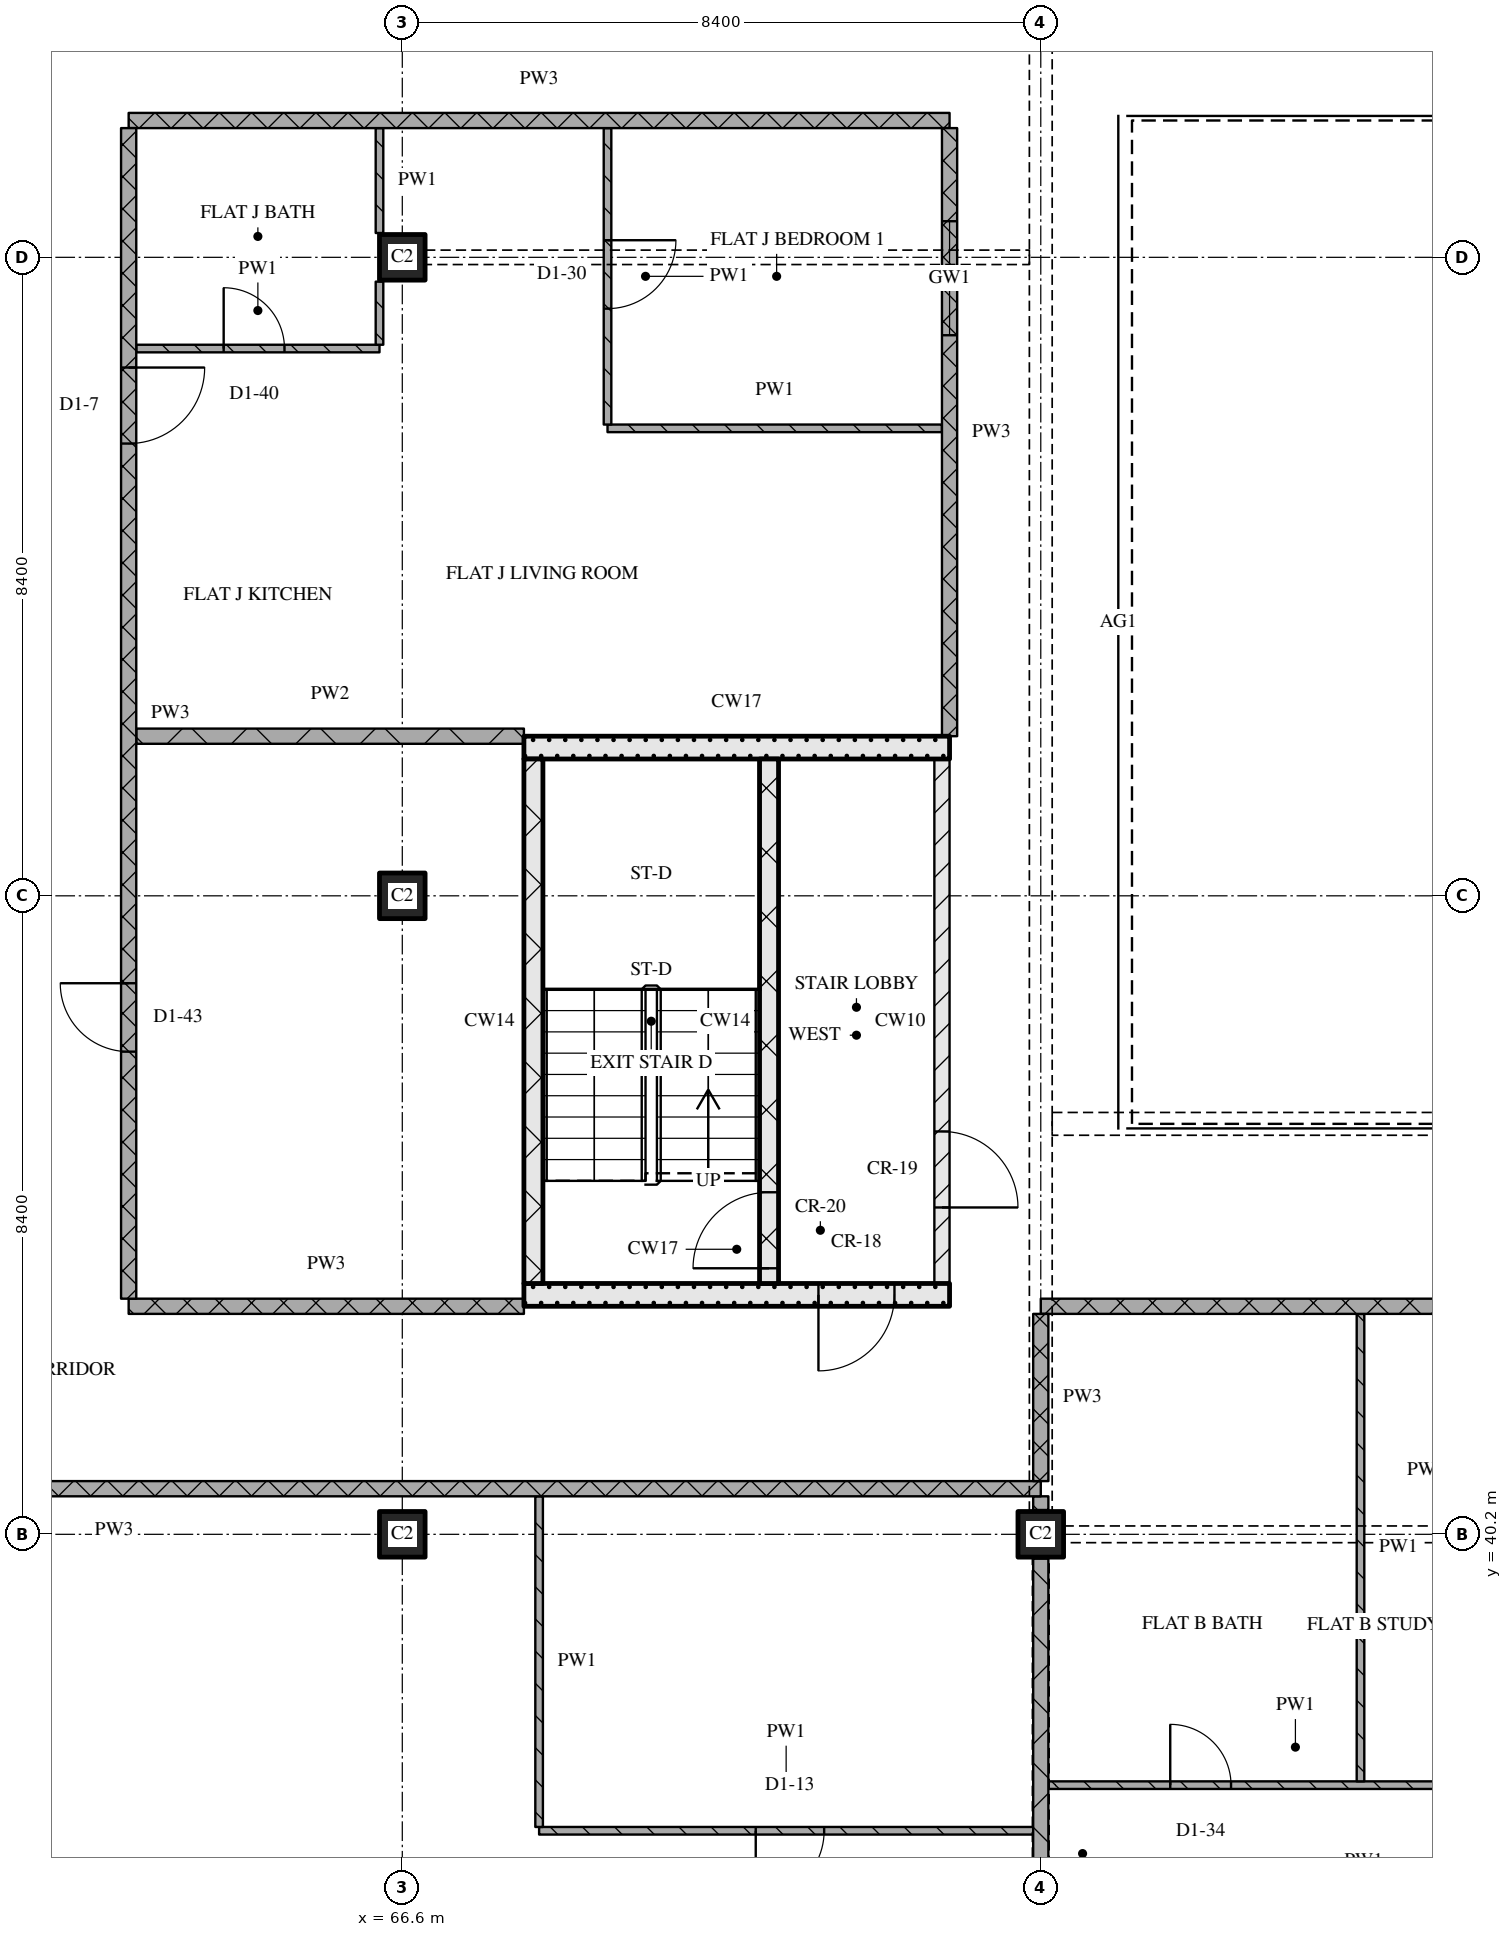
"""IFC4 building model, lengths in metres.
Left out: names, types, materials, properties, quantities, classifications, styles, units other than length and angle.
Written with IfcOpenShell. Run it as: python <this file> out.ifc"""

import sys

from ifc_helpers import new_model, si_unit, direction, frame, frame_2d, origin, origin_2d, place, context, subcontext, project, spatial, rectangle, extrude, element, fill, save


model = new_model("IFC4")
c1 = context("Model", 3, precision=1e-05, world=origin(), true_north=direction((0.0, 1.0)))
c2 = subcontext(c1, "Body", "Model", "MODEL_VIEW")
j1 = project(units=[si_unit("LENGTHUNIT", "METRE"), si_unit("PLANEANGLEUNIT", "RADIAN")], contexts=[c1])
p1 = place(None, origin())
s1 = spatial("IfcSite", under=j1, at=p1, CompositionType="ELEMENT")
p2 = place(p1, origin())
s2 = spatial("IfcBuilding", under=s1, at=p2, CompositionType="ELEMENT")
p3 = place(p2, frame((0.0, 0.0, 205.5)))
s3 = spatial("IfcBuildingStorey", under=s2, at=p3, CompositionType="ELEMENT", Elevation=205.5)
for number, where, z_axis, x_axis in (
    (1, (66.6, 40.2, 0.0), (0.0, 0.0, 1.0), (1.0, 0.0, 0.0)),
    (2, (66.6, 48.6, 0.0), (0.0, 0.0, 1.0), (1.0, 0.0, 0.0)),
    (3, (66.6, 57.0, 0.0), (0.0, 0.0, 1.0), (1.0, 0.0, 0.0)),
    (4, (75.0, 40.2, 0.0), (0.0, 0.0, 1.0), (1.0, 0.0, 0.0)),
):
    element("IfcColumn", number, at=place(p3, frame(where, z_axis=z_axis, x_axis=x_axis)), inside=s3, PredefinedType="COLUMN", context=c2, shape_type="SweptSolid", body=[
        extrude(rectangle(XDim=0.6, YDim=0.6, at=origin_2d()), origin(), (0.0, 0.0, 1.0), 3.6),
    ])
p4 = place(p3, frame((68.2, 43.35, 0.0), z_axis=(0.0, 0.0, 1.0), x_axis=(1.0, 0.0, 0.0)))
e5 = element("IfcWall", 5, at=p4, inside=s3, PredefinedType="SOLIDWALL", context=c2, shape_type="SweptSolid", body=[
    extrude(rectangle(XDim=5.6, YDim=0.3, at=frame_2d((2.8, 0.0))), origin(), (0.0, 0.0, 1.0), 3.32),
])
p5 = place(p4, frame((3.875, 0.0, 0.0)))
e6 = element("IfcOpeningElement", 6, at=p5, cuts=e5, PredefinedType="OPENING", context=c2, shape_type="SweptSolid", body=[
    extrude(rectangle(XDim=1.0, YDim=2.1, at=frame_2d((0.5, 1.05))), frame((0.0, 0.16, 0.0), z_axis=(0.0, -1.0, 0.0), x_axis=(1.0, 0.0, 0.0)), (0.0, 0.0, 1.0), 0.32),
])
p6 = place(p3, frame((68.325, 43.5, 0.0), z_axis=(0.0, 0.0, 1.0), x_axis=(0.0, 1.0, 0.0)))
e7 = element("IfcWall", 7, at=p6, inside=s3, PredefinedType="SOLIDWALL", context=c2, shape_type="SweptSolid", body=[
    extrude(rectangle(XDim=6.9, YDim=0.25, at=frame_2d((3.45, 0.0))), origin(), (0.0, 0.0, 1.0), 3.32),
])
p7 = place(p3, frame((71.425, 43.5, 0.0), z_axis=(0.0, 0.0, 1.0), x_axis=(0.0, 1.0, 0.0)))
e8 = element("IfcWall", 8, at=p7, inside=s3, PredefinedType="SOLIDWALL", context=c2, shape_type="SweptSolid", body=[
    extrude(rectangle(XDim=6.9, YDim=0.25, at=frame_2d((3.45, 0.0))), origin(), (0.0, 0.0, 1.0), 3.32),
])
p8 = place(p7, frame((0.2, 0.0, 0.0)))
e9 = element("IfcOpeningElement", 9, at=p8, cuts=e8, PredefinedType="OPENING", context=c2, shape_type="SweptSolid", body=[
    extrude(rectangle(XDim=1.0, YDim=2.1, at=frame_2d((0.5, 1.05))), frame((0.0, 0.135, 0.0), z_axis=(0.0, -1.0, 0.0), x_axis=(1.0, 0.0, 0.0)), (0.0, 0.0, 1.0), 0.27),
])
p9 = place(p3, frame((73.7, 43.5, 0.0), z_axis=(0.0, 0.0, 1.0), x_axis=(0.0, 1.0, 0.0)))
e10 = element("IfcWall", 10, at=p9, inside=s3, PredefinedType="PARTITIONING", context=c2, shape_type="SweptSolid", body=[
    extrude(rectangle(XDim=6.9, YDim=0.2, at=frame_2d((3.45, 0.0))), origin(), (0.0, 0.0, 1.0), 3.32),
])
p10 = place(p9, frame((1.0, 0.0, 0.0)))
e11 = element("IfcOpeningElement", 11, at=p10, cuts=e10, PredefinedType="OPENING", context=c2, shape_type="SweptSolid", body=[
    extrude(rectangle(XDim=1.0, YDim=2.1, at=frame_2d((0.5, 1.05))), frame((0.0, 0.11, 0.0), z_axis=(0.0, -1.0, 0.0), x_axis=(1.0, 0.0, 0.0)), (0.0, 0.0, 1.0), 0.22),
])
p11 = place(p3, frame((68.2, 50.55, 0.0), z_axis=(0.0, 0.0, 1.0), x_axis=(1.0, 0.0, 0.0)))
e12 = element("IfcWall", 12, at=p11, inside=s3, PredefinedType="SOLIDWALL", context=c2, shape_type="SweptSolid", body=[
    extrude(rectangle(XDim=5.6, YDim=0.3, at=frame_2d((2.8, 0.0))), origin(), (0.0, 0.0, 1.0), 3.32),
])
p12 = place(p3, frame((68.4, 36.3, 0.0), z_axis=(0.0, 0.0, 1.0), x_axis=(1.0, 0.0, 0.0)))
e13 = element("IfcWall", 13, at=p12, inside=s3, PredefinedType="PARTITIONING", context=c2, shape_type="SweptSolid", body=[
    extrude(rectangle(XDim=6.5, YDim=0.1, at=frame_2d((3.25, 0.0))), origin(), (0.0, 0.0, 1.0), 3.32),
])
p13 = place(p12, frame((2.85, 0.0, 0.0)))
e14 = element("IfcOpeningElement", 14, at=p13, cuts=e13, PredefinedType="OPENING", context=c2, shape_type="SweptSolid", body=[
    extrude(rectangle(XDim=0.9, YDim=2.1, at=frame_2d((0.45, 1.05))), frame((0.0, 0.06, 0.0), z_axis=(0.0, -1.0, 0.0), x_axis=(1.0, 0.0, 0.0)), (0.0, 0.0, 1.0), 0.12),
])
p14 = place(p3, frame((75.1, 36.9, 0.0), z_axis=(0.0, 0.0, 1.0), x_axis=(1.0, 0.0, 0.0)))
e15 = element("IfcWall", 15, at=p14, inside=s3, PredefinedType="PARTITIONING", context=c2, shape_type="SweptSolid", body=[
    extrude(rectangle(XDim=6.5, YDim=0.1, at=frame_2d((3.25, 0.0))), origin(), (0.0, 0.0, 1.0), 3.32),
])
p15 = place(p14, frame((1.603, 0.0, 0.0)))
e16 = element("IfcOpeningElement", 16, at=p15, cuts=e15, PredefinedType="OPENING", context=c2, shape_type="SweptSolid", body=[
    extrude(rectangle(XDim=0.8, YDim=2.1, at=frame_2d((0.4, 1.05))), frame((0.0, 0.06, 0.0), z_axis=(0.0, -1.0, 0.0), x_axis=(1.0, 0.0, 0.0)), (0.0, 0.0, 1.0), 0.12),
])
p16 = place(p3, frame((75.0, 40.8, 0.0), z_axis=(0.0, 0.0, 1.0), x_axis=(-1.0, 0.0, 0.0)))
e17 = element("IfcWall", 17, at=p16, inside=s3, PredefinedType="PARTITIONING", context=c2, shape_type="SweptSolid", body=[
    extrude(rectangle(XDim=24.38, YDim=0.2, at=frame_2d((12.19, 0.0))), origin(), (0.0, 0.0, 1.0), 3.32),
])
p17 = place(p16, frame((14.35, 0.0, 0.0)))
e18 = element("IfcOpeningElement", 18, at=p17, cuts=e17, PredefinedType="OPENING", context=c2, shape_type="SweptSolid", body=[
    extrude(rectangle(XDim=1.0, YDim=2.1, at=frame_2d((0.5, 1.05))), frame((0.0, 0.11, 0.0), z_axis=(0.0, -1.0, 0.0), x_axis=(1.0, 0.0, 0.0)), (0.0, 0.0, 1.0), 0.22),
])
p18 = place(p3, frame((63.0, 43.2, 0.0), z_axis=(0.0, 0.0, 1.0), x_axis=(1.0, 0.0, 0.0)))
e19 = element("IfcWall", 19, at=p18, inside=s3, PredefinedType="PARTITIONING", context=c2, shape_type="SweptSolid", body=[
    extrude(rectangle(XDim=5.2, YDim=0.2, at=frame_2d((2.6, 0.0))), origin(), (0.0, 0.0, 1.0), 3.32),
])
p19 = place(p3, frame((100.2, 43.2, 0.0), z_axis=(0.0, 0.0, 1.0), x_axis=(-1.0, 0.0, 0.0)))
e20 = element("IfcWall", 20, at=p19, inside=s3, PredefinedType="PARTITIONING", context=c2, shape_type="SweptSolid", body=[
    extrude(rectangle(XDim=25.2, YDim=0.2, at=frame_2d((12.6, 0.0))), origin(), (0.0, 0.0, 1.0), 3.32),
])
p20 = place(p19, frame((4.15, 0.0, 0.0)))
e21 = element("IfcOpeningElement", 21, at=p20, cuts=e20, PredefinedType="OPENING", context=c2, shape_type="SweptSolid", body=[
    extrude(rectangle(XDim=1.0, YDim=2.1, at=frame_2d((0.5, 1.05))), frame((0.0, 0.11, 0.0), z_axis=(0.0, -1.0, 0.0), x_axis=(1.0, 0.0, 0.0)), (0.0, 0.0, 1.0), 0.22),
])
p21 = place(p19, frame((17.35, 0.0, 0.0)))
e22 = element("IfcOpeningElement", 22, at=p21, cuts=e20, PredefinedType="OPENING", context=c2, shape_type="SweptSolid", body=[
    extrude(rectangle(XDim=1.0, YDim=2.1, at=frame_2d((0.5, 1.05))), frame((0.0, 0.11, 0.0), z_axis=(0.0, -1.0, 0.0), x_axis=(1.0, 0.0, 0.0)), (0.0, 0.0, 1.0), 0.22),
])
p22 = place(p3, frame((63.1, 50.7, 0.0), z_axis=(0.0, 0.0, 1.0), x_axis=(1.0, 0.0, 0.0)))
e23 = element("IfcWall", 23, at=p22, inside=s3, PredefinedType="PARTITIONING", context=c2, shape_type="SweptSolid", body=[
    extrude(rectangle(XDim=5.1, YDim=0.2, at=frame_2d((2.55, 0.0))), origin(), (0.0, 0.0, 1.0), 3.32),
])
p23 = place(p3, frame((69.3, 54.75, 0.0), z_axis=(0.0, 0.0, 1.0), x_axis=(1.0, 0.0, 0.0)))
e24 = element("IfcWall", 24, at=p23, inside=s3, PredefinedType="PARTITIONING", context=c2, shape_type="SweptSolid", body=[
    extrude(rectangle(XDim=4.4, YDim=0.1, at=frame_2d((2.2, 0.0))), origin(), (0.0, 0.0, 1.0), 3.32),
])
p24 = place(p3, frame((63.1, 55.8, 0.0), z_axis=(0.0, 0.0, 1.0), x_axis=(1.0, 0.0, 0.0)))
e25 = element("IfcWall", 25, at=p24, inside=s3, PredefinedType="PARTITIONING", context=c2, shape_type="SweptSolid", body=[
    extrude(rectangle(XDim=3.2, YDim=0.1, at=frame_2d((1.6, 0.0))), origin(), (0.0, 0.0, 1.0), 3.32),
])
p25 = place(p24, frame((1.15, 0.0, 0.0)))
e26 = element("IfcOpeningElement", 26, at=p25, cuts=e25, PredefinedType="OPENING", context=c2, shape_type="SweptSolid", body=[
    extrude(rectangle(XDim=0.8, YDim=2.1, at=frame_2d((0.4, 1.05))), frame((0.0, 0.06, 0.0), z_axis=(0.0, -1.0, 0.0), x_axis=(1.0, 0.0, 0.0)), (0.0, 0.0, 1.0), 0.12),
])
p26 = place(p3, frame((63.0, 58.8, 0.0), z_axis=(0.0, 0.0, 1.0), x_axis=(1.0, 0.0, 0.0)))
e27 = element("IfcWall", 27, at=p26, inside=s3, PredefinedType="PARTITIONING", context=c2, shape_type="SweptSolid", body=[
    extrude(rectangle(XDim=10.8, YDim=0.2, at=frame_2d((5.4, 0.0))), origin(), (0.0, 0.0, 1.0), 3.32),
])
p27 = place(p3, frame((63.0, 58.7, 0.0), z_axis=(0.0, 0.0, 1.0), x_axis=(0.0, -1.0, 0.0)))
e28 = element("IfcWall", 28, at=p27, inside=s3, PredefinedType="PARTITIONING", context=c2, shape_type="SweptSolid", body=[
    extrude(rectangle(XDim=15.4, YDim=0.2, at=frame_2d((7.7, 0.0))), origin(), (0.0, 0.0, 1.0), 3.32),
])
p28 = place(p27, frame((3.15, 0.0, 0.0)))
e29 = element("IfcOpeningElement", 29, at=p28, cuts=e28, PredefinedType="OPENING", context=c2, shape_type="SweptSolid", body=[
    extrude(rectangle(XDim=1.0, YDim=2.1, at=frame_2d((0.5, 1.05))), frame((0.0, 0.11, 0.0), z_axis=(0.0, -1.0, 0.0), x_axis=(1.0, 0.0, 0.0)), (0.0, 0.0, 1.0), 0.22),
])
p29 = place(p27, frame((11.25, 0.0, 0.0)))
e30 = element("IfcOpeningElement", 30, at=p29, cuts=e28, PredefinedType="OPENING", context=c2, shape_type="SweptSolid", body=[
    extrude(rectangle(XDim=0.9, YDim=2.1, at=frame_2d((0.45, 1.05))), frame((0.0, 0.11, 0.0), z_axis=(0.0, -1.0, 0.0), x_axis=(1.0, 0.0, 0.0)), (0.0, 0.0, 1.0), 0.22),
])
p30 = place(p3, frame((66.3, 56.68, 0.0), z_axis=(0.0, 0.0, 1.0), x_axis=(0.0, -1.0, 0.0)))
e31 = element("IfcWall", 31, at=p30, inside=s3, PredefinedType="PARTITIONING", context=c2, shape_type="SweptSolid", body=[
    extrude(rectangle(XDim=0.83, YDim=0.1, at=frame_2d((0.415, 0.0))), origin(), (0.0, 0.0, 1.0), 3.32),
])
p31 = place(p3, frame((66.3, 58.7, 0.0), z_axis=(0.0, 0.0, 1.0), x_axis=(0.0, -1.0, 0.0)))
e32 = element("IfcWall", 32, at=p31, inside=s3, PredefinedType="PARTITIONING", context=c2, shape_type="SweptSolid", body=[
    extrude(rectangle(XDim=1.38, YDim=0.1, at=frame_2d((0.69, 0.0))), origin(), (0.0, 0.0, 1.0), 3.32),
])
p32 = place(p3, frame((68.4, 40.7, 0.0), z_axis=(0.0, 0.0, 1.0), x_axis=(0.0, -1.0, 0.0)))
e33 = element("IfcWall", 33, at=p32, inside=s3, PredefinedType="PARTITIONING", context=c2, shape_type="SweptSolid", body=[
    extrude(rectangle(XDim=4.35, YDim=0.1, at=frame_2d((2.175, 0.0))), origin(), (0.0, 0.0, 1.0), 3.32),
])
p33 = place(p3, frame((69.3, 58.7, 0.0), z_axis=(0.0, 0.0, 1.0), x_axis=(0.0, -1.0, 0.0)))
e34 = element("IfcWall", 34, at=p33, inside=s3, PredefinedType="PARTITIONING", context=c2, shape_type="SweptSolid", body=[
    extrude(rectangle(XDim=3.9, YDim=0.1, at=frame_2d((1.95, 0.0))), origin(), (0.0, 0.0, 1.0), 3.32),
])
p34 = place(p33, frame((1.475, 0.0, 0.0)))
e35 = element("IfcOpeningElement", 35, at=p34, cuts=e34, PredefinedType="OPENING", context=c2, shape_type="SweptSolid", body=[
    extrude(rectangle(XDim=0.9, YDim=2.1, at=frame_2d((0.45, 1.05))), frame((0.0, 0.06, 0.0), z_axis=(0.0, -1.0, 0.0), x_axis=(1.0, 0.0, 0.0)), (0.0, 0.0, 1.0), 0.12),
])
p35 = place(p3, frame((73.8, 58.7, 0.0), z_axis=(0.0, 0.0, 1.0), x_axis=(0.0, -1.0, 0.0)))
e36 = element("IfcWall", 36, at=p35, inside=s3, PredefinedType="PARTITIONING", context=c2, shape_type="SweptSolid", body=[
    extrude(rectangle(XDim=8.0, YDim=0.2, at=frame_2d((4.0, 0.0))), origin(), (0.0, 0.0, 1.0), 3.32),
])
p36 = place(p35, frame((1.225, 0.0, 0.9)))
e37 = element("IfcOpeningElement", 37, at=p36, cuts=e36, PredefinedType="OPENING", context=c2, shape_type="SweptSolid", body=[
    extrude(rectangle(XDim=1.5, YDim=1.5, at=frame_2d((0.75, 0.75))), frame((0.0, 0.11, 0.0), z_axis=(0.0, -1.0, 0.0), x_axis=(1.0, 0.0, 0.0)), (0.0, 0.0, 1.0), 0.22),
])
p37 = place(p3, frame((75.0, 43.1, 0.0), z_axis=(0.0, 0.0, 1.0), x_axis=(0.0, -1.0, 0.0)))
e38 = element("IfcWall", 38, at=p37, inside=s3, PredefinedType="PARTITIONING", context=c2, shape_type="SweptSolid", body=[
    extrude(rectangle(XDim=2.2, YDim=0.2, at=frame_2d((1.1, 0.0))), origin(), (0.0, 0.0, 1.0), 2.53),
])
p38 = place(p3, frame((75.0, 39.88, 0.0), z_axis=(0.0, 0.0, 1.0), x_axis=(0.0, -1.0, 0.0)))
e39 = element("IfcWall", 39, at=p38, inside=s3, PredefinedType="PARTITIONING", context=c2, shape_type="SweptSolid", body=[
    extrude(rectangle(XDim=7.76, YDim=0.2, at=frame_2d((3.88, 0.0))), origin(), (0.0, 0.0, 1.0), 2.72),
])
p39 = place(p3, frame((75.0, 40.7, 0.0), z_axis=(0.0, 0.0, 1.0), x_axis=(0.0, -1.0, 0.0)))
e40 = element("IfcWall", 40, at=p39, inside=s3, PredefinedType="PARTITIONING", context=c2, shape_type="SweptSolid", body=[
    extrude(rectangle(XDim=0.18, YDim=0.2, at=frame_2d((0.09, 0.0))), origin(), (0.0, 0.0, 1.0), 3.32),
])
p40 = place(p3, frame((79.206, 43.1, 0.0), z_axis=(0.0, 0.0, 1.0), x_axis=(0.0, -1.0, 0.0)))
e41 = element("IfcWall", 41, at=p40, inside=s3, PredefinedType="PARTITIONING", context=c2, shape_type="SweptSolid", body=[
    extrude(rectangle(XDim=6.15, YDim=0.1, at=frame_2d((3.075, 0.0))), origin(), (0.0, 0.0, 1.0), 3.32),
])
p41 = place(p5, origin())
e42 = element("IfcDoor", 42, at=p41, inside=s3, OperationType="SINGLE_SWING_RIGHT", PredefinedType="DOOR", context=c2, shape_type="SweptSolid", body=[
    extrude(rectangle(XDim=1.0, YDim=2.1, at=frame_2d((0.5, 1.05))), frame((0.0, 0.025, 0.0), z_axis=(0.0, -1.0, 0.0), x_axis=(1.0, 0.0, 0.0)), (0.0, 0.0, 1.0), 0.05),
])
fill(e6, e42)
p42 = place(p8, origin())
e43 = element("IfcDoor", 43, at=p42, inside=s3, OperationType="SINGLE_SWING_LEFT", PredefinedType="DOOR", context=c2, shape_type="SweptSolid", body=[
    extrude(rectangle(XDim=1.0, YDim=2.1, at=frame_2d((0.5, 1.05))), frame((0.0, 0.025, 0.0), z_axis=(0.0, -1.0, 0.0), x_axis=(1.0, 0.0, 0.0)), (0.0, 0.0, 1.0), 0.05),
])
fill(e9, e43)
p43 = place(p10, origin())
e44 = element("IfcDoor", 44, at=p43, inside=s3, OperationType="SINGLE_SWING_RIGHT", PredefinedType="DOOR", context=c2, shape_type="SweptSolid", body=[
    extrude(rectangle(XDim=1.0, YDim=2.1, at=frame_2d((0.5, 1.05))), frame((0.0, 0.025, 0.0), z_axis=(0.0, -1.0, 0.0), x_axis=(1.0, 0.0, 0.0)), (0.0, 0.0, 1.0), 0.05),
])
fill(e11, e44)
p44 = place(p13, origin())
e45 = element("IfcDoor", 45, at=p44, inside=s3, OperationType="SINGLE_SWING_RIGHT", PredefinedType="DOOR", context=c2, shape_type="SweptSolid", body=[
    extrude(rectangle(XDim=0.9, YDim=2.1, at=frame_2d((0.45, 1.05))), frame((0.0, 0.025, 0.0), z_axis=(0.0, -1.0, 0.0), x_axis=(1.0, 0.0, 0.0)), (0.0, 0.0, 1.0), 0.05),
])
fill(e14, e45)
p45 = place(p15, origin())
e46 = element("IfcDoor", 46, at=p45, inside=s3, OperationType="SINGLE_SWING_LEFT", PredefinedType="DOOR", context=c2, shape_type="SweptSolid", body=[
    extrude(rectangle(XDim=0.8, YDim=2.1, at=frame_2d((0.4, 1.05))), frame((0.0, 0.025, 0.0), z_axis=(0.0, -1.0, 0.0), x_axis=(1.0, 0.0, 0.0)), (0.0, 0.0, 1.0), 0.05),
])
fill(e16, e46)
p46 = place(p25, origin())
e47 = element("IfcDoor", 47, at=p46, inside=s3, OperationType="SINGLE_SWING_LEFT", PredefinedType="DOOR", context=c2, shape_type="SweptSolid", body=[
    extrude(rectangle(XDim=0.8, YDim=2.1, at=frame_2d((0.4, 1.05))), frame((0.0, 0.025, 0.0), z_axis=(0.0, -1.0, 0.0), x_axis=(1.0, 0.0, 0.0)), (0.0, 0.0, 1.0), 0.05),
])
fill(e26, e47)
p47 = place(p28, origin())
e48 = element("IfcDoor", 48, at=p47, inside=s3, OperationType="SINGLE_SWING_LEFT", PredefinedType="DOOR", context=c2, shape_type="SweptSolid", body=[
    extrude(rectangle(XDim=1.0, YDim=2.1, at=frame_2d((0.5, 1.05))), frame((0.0, 0.025, 0.0), z_axis=(0.0, -1.0, 0.0), x_axis=(1.0, 0.0, 0.0)), (0.0, 0.0, 1.0), 0.05),
])
fill(e29, e48)
p48 = place(p29, origin())
e49 = element("IfcDoor", 49, at=p48, inside=s3, OperationType="SINGLE_SWING_RIGHT", PredefinedType="DOOR", context=c2, shape_type="SweptSolid", body=[
    extrude(rectangle(XDim=0.9, YDim=2.1, at=frame_2d((0.45, 1.05))), frame((0.0, 0.025, 0.0), z_axis=(0.0, -1.0, 0.0), x_axis=(1.0, 0.0, 0.0)), (0.0, 0.0, 1.0), 0.05),
])
fill(e30, e49)
p49 = place(p34, origin())
e50 = element("IfcDoor", 50, at=p49, inside=s3, OperationType="SINGLE_SWING_LEFT", PredefinedType="DOOR", context=c2, shape_type="SweptSolid", body=[
    extrude(rectangle(XDim=0.9, YDim=2.1, at=frame_2d((0.45, 1.05))), frame((0.0, 0.025, 0.0), z_axis=(0.0, -1.0, 0.0), x_axis=(1.0, 0.0, 0.0)), (0.0, 0.0, 1.0), 0.05),
])
fill(e35, e50)
p50 = place(p36, origin())
e51 = element("IfcWindow", 51, at=p50, inside=s3, PartitioningType="SINGLE_PANEL", PredefinedType="WINDOW", context=c2, shape_type="SweptSolid", body=[
    extrude(rectangle(XDim=1.5, YDim=1.5, at=frame_2d((0.75, 0.75))), frame((0.0, 0.03, 0.0), z_axis=(0.0, -1.0, 0.0), x_axis=(1.0, 0.0, 0.0)), (0.0, 0.0, 1.0), 0.06),
])
fill(e37, e51)
save(model, sys.argv[1])
